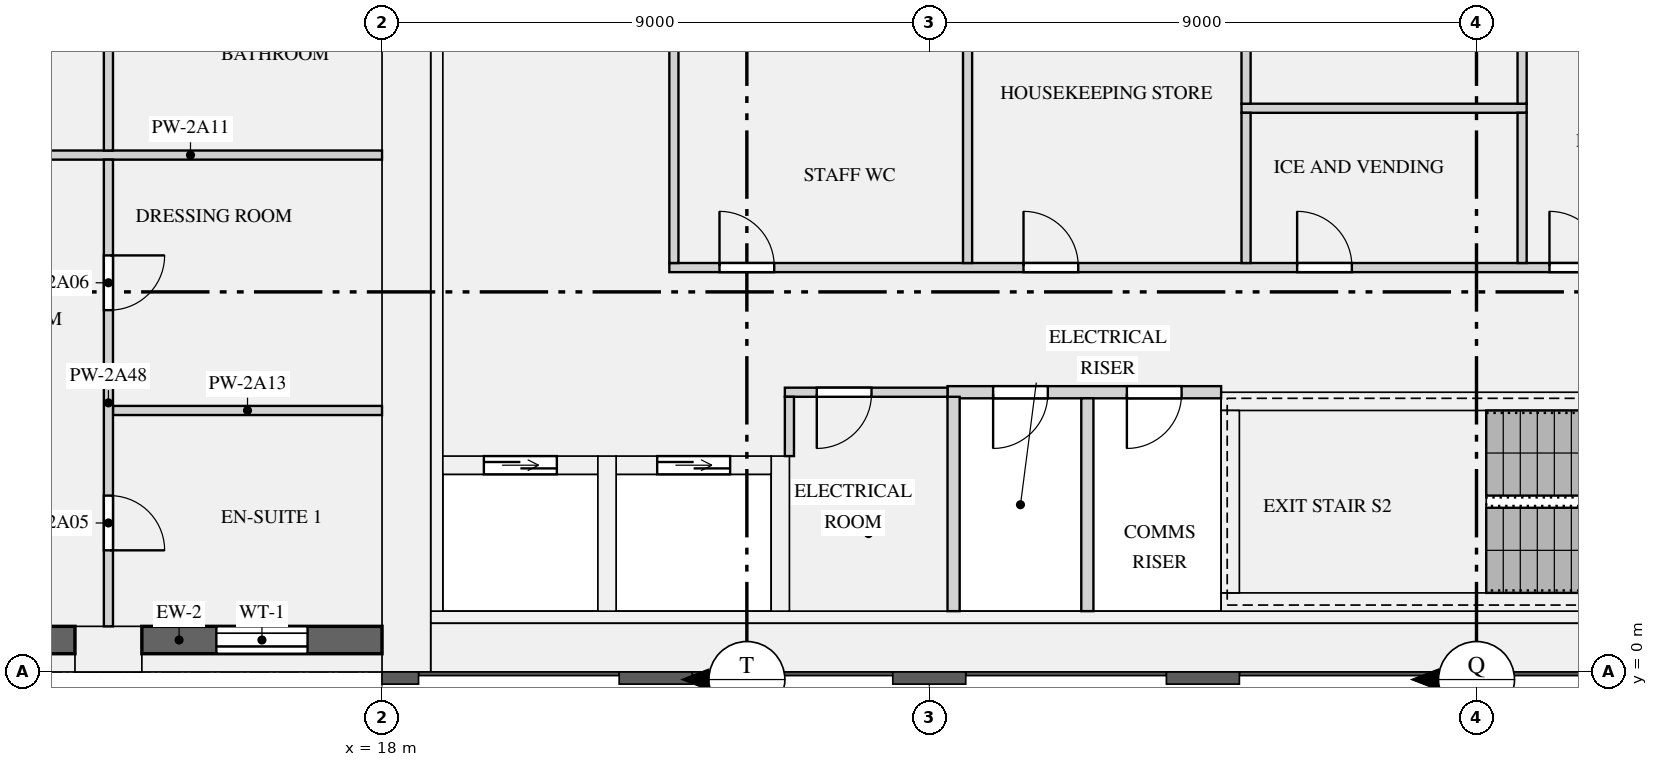
"""IFC4 building model, lengths in metres.
Left out: names, types, materials, properties, quantities, classifications, styles, units other than length and angle.
Written with IfcOpenShell. Run it as: python <this file> out.ifc"""

import sys

from ifc_helpers import new_model, si_unit, direction, frame, frame_2d, origin, origin_2d, place, context, subcontext, project, spatial, rectangle, extrude, element, fill, save


model = new_model("IFC4")
c1 = context("Model", 3, precision=1e-05, world=origin(), true_north=direction((0.0, 1.0)))
c2 = subcontext(c1, "Body", "Model", "MODEL_VIEW")
j1 = project(units=[si_unit("LENGTHUNIT", "METRE"), si_unit("PLANEANGLEUNIT", "RADIAN")], contexts=[c1])
p1 = place(None, origin())
s1 = spatial("IfcSite", under=j1, at=p1, CompositionType="ELEMENT")
p2 = place(p1, origin())
s2 = spatial("IfcBuilding", under=s1, at=p2, CompositionType="ELEMENT")
p3 = place(p2, frame((0.0, 0.0, 83.55)))
s3 = spatial("IfcBuildingStorey", under=s2, at=p3, CompositionType="ELEMENT", Elevation=83.55)
p4 = place(p3, frame((13.5, 0.375, 0.0), z_axis=(0.0, 0.0, 1.0), x_axis=(1.0, 0.0, 0.0)))
e1 = element("IfcColumn", 1, at=p4, inside=s3, PredefinedType="USERDEFINED", context=c2, shape_type="SweptSolid", body=[
    extrude(rectangle(XDim=1.1, YDim=0.75, at=origin_2d()), origin(), (0.0, 0.0, 1.0), 3.15),
])
p5 = place(p3, frame((18.4, 0.0, 0.0), z_axis=(0.0, 0.0, 1.0), x_axis=(0.0, 1.0, 0.0)))
e2 = element("IfcWall", 2, at=p5, inside=s3, PredefinedType="SHEAR", context=c2, shape_type="SweptSolid", body=[
    extrude(rectangle(XDim=12.5, YDim=0.8, at=frame_2d((6.25, 0.0))), origin(), (0.0, 0.0, 1.0), 3.15),
])
p6 = place(p3, frame((18.8, 0.4, 0.0), z_axis=(0.0, 0.0, 1.0), x_axis=(1.0, 0.0, 0.0)))
e3 = element("IfcWall", 3, at=p6, inside=s3, PredefinedType="SHEAR", context=c2, shape_type="SweptSolid", body=[
    extrude(rectangle(XDim=34.4, YDim=0.8, at=frame_2d((17.2, 0.0))), origin(), (0.0, 0.0, 1.0), 3.15),
])
p7 = place(p3, frame((18.9, 1.0, 0.0), z_axis=(0.0, 0.0, 1.0), x_axis=(0.0, 1.0, 0.0)))
e4 = element("IfcWall", 4, at=p7, inside=s3, PredefinedType="SHEAR", context=c2, shape_type="SweptSolid", body=[
    extrude(rectangle(XDim=10.9, YDim=0.2, at=frame_2d((5.45, 0.0))), origin(), (0.0, 0.0, 1.0), 3.15),
])
p8 = place(p3, frame((18.8, 0.9, 0.0), z_axis=(0.0, 0.0, 1.0), x_axis=(1.0, 0.0, 0.0)))
e5 = element("IfcWall", 5, at=p8, inside=s3, PredefinedType="SHEAR", context=c2, shape_type="SweptSolid", body=[
    extrude(rectangle(XDim=34.4, YDim=0.2, at=frame_2d((17.2, 0.0))), origin(), (0.0, 0.0, 1.0), 3.15),
])
p9 = place(p3, frame((19.0, 3.4, 0.0), z_axis=(0.0, 0.0, 1.0), x_axis=(1.0, 0.0, 0.0)))
e6 = element("IfcWall", 6, at=p9, inside=s3, PredefinedType="SHEAR", context=c2, shape_type="SweptSolid", body=[
    extrude(rectangle(XDim=2.55, YDim=0.3, at=frame_2d((1.275, 0.0))), origin(), (0.0, 0.0, 1.0), 3.15),
])
p10 = place(p9, frame((0.675, 0.0, 0.0)))
e7 = element("IfcOpeningElement", 7, at=p10, cuts=e6, PredefinedType="OPENING", context=c2, shape_type="SweptSolid", body=[
    extrude(rectangle(XDim=1.2, YDim=2.1, at=frame_2d((0.6, 1.05))), frame((0.0, 0.16, 0.0), z_axis=(0.0, -1.0, 0.0), x_axis=(1.0, 0.0, 0.0)), (0.0, 0.0, 1.0), 0.32),
])
p11 = place(p3, frame((21.85, 3.4, 0.0), z_axis=(0.0, 0.0, 1.0), x_axis=(1.0, 0.0, 0.0)))
e8 = element("IfcWall", 8, at=p11, inside=s3, PredefinedType="SHEAR", context=c2, shape_type="SweptSolid", body=[
    extrude(rectangle(XDim=2.55, YDim=0.3, at=frame_2d((1.275, 0.0))), origin(), (0.0, 0.0, 1.0), 3.15),
])
p12 = place(p11, frame((0.675, 0.0, 0.0)))
e9 = element("IfcOpeningElement", 9, at=p12, cuts=e8, PredefinedType="OPENING", context=c2, shape_type="SweptSolid", body=[
    extrude(rectangle(XDim=1.2, YDim=2.1, at=frame_2d((0.6, 1.05))), frame((0.0, 0.16, 0.0), z_axis=(0.0, -1.0, 0.0), x_axis=(1.0, 0.0, 0.0)), (0.0, 0.0, 1.0), 0.32),
])
for number, where, z_axis, x_axis in (
    (10, (21.7, 1.0, 0.0), (0.0, 0.0, 1.0), (0.0, 1.0, 0.0)),
    (11, (24.55, 1.0, 0.0), (0.0, 0.0, 1.0), (0.0, 1.0, 0.0)),
):
    element("IfcWall", number, at=place(p3, frame(where, z_axis=z_axis, x_axis=x_axis)), inside=s3, PredefinedType="SHEAR", context=c2, shape_type="SweptSolid", body=[
        extrude(rectangle(XDim=2.55, YDim=0.3, at=frame_2d((1.275, 0.0))), origin(), (0.0, 0.0, 1.0), 3.15),
    ])
p13 = place(p3, frame((31.8, 1.15, 0.0), z_axis=(0.0, 0.0, 1.0), x_axis=(1.0, 0.0, 0.0)))
e12 = element("IfcWall", 12, at=p13, inside=s3, PredefinedType="SHEAR", context=c2, shape_type="SweptSolid", body=[
    extrude(rectangle(XDim=8.4, YDim=0.3, at=frame_2d((4.2, 0.0))), origin(), (0.0, 0.0, 1.0), 3.15),
])
p14 = place(p3, frame((31.8, 4.45, 0.0), z_axis=(0.0, 0.0, 1.0), x_axis=(1.0, 0.0, 0.0)))
e13 = element("IfcWall", 13, at=p14, inside=s3, PredefinedType="SHEAR", context=c2, shape_type="SweptSolid", body=[
    extrude(rectangle(XDim=8.4, YDim=0.3, at=frame_2d((4.2, 0.0))), origin(), (0.0, 0.0, 1.0), 3.15),
])
p15 = place(p14, frame((6.8, 0.0, 0.0)))
e14 = element("IfcOpeningElement", 14, at=p15, cuts=e13, PredefinedType="OPENING", context=c2, shape_type="SweptSolid", body=[
    extrude(rectangle(XDim=1.1, YDim=2.1, at=frame_2d((0.55, 1.05))), frame((0.0, 0.16, 0.0), z_axis=(0.0, -1.0, 0.0), x_axis=(1.0, 0.0, 0.0)), (0.0, 0.0, 1.0), 0.32),
])
p16 = place(p3, frame((31.95, 1.3, 0.0), z_axis=(0.0, 0.0, 1.0), x_axis=(0.0, 1.0, 0.0)))
e15 = element("IfcWall", 15, at=p16, inside=s3, PredefinedType="SHEAR", context=c2, shape_type="SweptSolid", body=[
    extrude(rectangle(XDim=3.0, YDim=0.3, at=frame_2d((1.5, 0.0))), origin(), (0.0, 0.0, 1.0), 3.15),
])
p17 = place(p3, frame((10.1, 0.525, 0.9), z_axis=(0.0, 0.0, 1.0), x_axis=(1.0, 0.0, 0.0)))
e16 = element("IfcWall", 16, at=p17, inside=s3, PredefinedType="SOLIDWALL", context=c2, shape_type="SweptSolid", body=[
    extrude(rectangle(XDim=2.85, YDim=0.45, at=frame_2d((1.425, 0.0))), origin(), (0.0, 0.0, 1.0), 1.93),
])
p18 = place(p17, frame((0.675, 0.0, 0.15)))
e17 = element("IfcOpeningElement", 17, at=p18, cuts=e16, PredefinedType="OPENING", context=c2, shape_type="SweptSolid", body=[
    extrude(rectangle(XDim=1.5, YDim=1.5, at=frame_2d((0.75, 0.75))), frame((0.0, 0.235, 0.0), z_axis=(0.0, -1.0, 0.0), x_axis=(1.0, 0.0, 0.0)), (0.0, 0.0, 1.0), 0.47),
])
p19 = place(p3, frame((14.05, 0.525, 0.9), z_axis=(0.0, 0.0, 1.0), x_axis=(1.0, 0.0, 0.0)))
e18 = element("IfcWall", 18, at=p19, inside=s3, PredefinedType="SOLIDWALL", context=c2, shape_type="SweptSolid", body=[
    extrude(rectangle(XDim=3.95, YDim=0.45, at=frame_2d((1.975, 0.0))), origin(), (0.0, 0.0, 1.0), 1.93),
])
p20 = place(p19, frame((1.225, 0.0, 0.15)))
e19 = element("IfcOpeningElement", 19, at=p20, cuts=e18, PredefinedType="OPENING", context=c2, shape_type="SweptSolid", body=[
    extrude(rectangle(XDim=1.5, YDim=1.5, at=frame_2d((0.75, 0.75))), frame((0.0, 0.235, 0.0), z_axis=(0.0, -1.0, 0.0), x_axis=(1.0, 0.0, 0.0)), (0.0, 0.0, 1.0), 0.47),
])
p21 = place(p3, frame((27.3, 4.6, 0.0), z_axis=(0.0, 0.0, 1.0), x_axis=(1.0, 0.0, 0.0)))
e20 = element("IfcWall", 20, at=p21, inside=s3, PredefinedType="PARTITIONING", context=c2, shape_type="SweptSolid", body=[
    extrude(rectangle(XDim=4.5, YDim=0.2, at=frame_2d((2.25, 0.0))), origin(), (0.0, 0.0, 1.0), 2.83),
])
p22 = place(p21, frame((0.75, 0.0, 0.0)))
e21 = element("IfcOpeningElement", 21, at=p22, cuts=e20, PredefinedType="OPENING", context=c2, shape_type="SweptSolid", body=[
    extrude(rectangle(XDim=0.9, YDim=2.1, at=frame_2d((0.45, 1.05))), frame((0.0, 0.11, 0.0), z_axis=(0.0, -1.0, 0.0), x_axis=(1.0, 0.0, 0.0)), (0.0, 0.0, 1.0), 0.22),
])
p23 = place(p21, frame((2.95, 0.0, 0.0)))
e22 = element("IfcOpeningElement", 22, at=p23, cuts=e20, PredefinedType="OPENING", context=c2, shape_type="SweptSolid", body=[
    extrude(rectangle(XDim=0.9, YDim=2.1, at=frame_2d((0.45, 1.05))), frame((0.0, 0.11, 0.0), z_axis=(0.0, -1.0, 0.0), x_axis=(1.0, 0.0, 0.0)), (0.0, 0.0, 1.0), 0.22),
])
p24 = place(p3, frame((24.625, 4.6, 0.0), z_axis=(0.0, 0.0, 1.0), x_axis=(1.0, 0.0, 0.0)))
e23 = element("IfcWall", 23, at=p24, inside=s3, PredefinedType="PARTITIONING", context=c2, shape_type="SweptSolid", body=[
    extrude(rectangle(XDim=2.675, YDim=0.15, at=frame_2d((1.337, 0.0))), origin(), (0.0, 0.0, 1.0), 2.83),
])
p25 = place(p24, frame((0.525, 0.0, 0.0)))
e24 = element("IfcOpeningElement", 24, at=p25, cuts=e23, PredefinedType="OPENING", context=c2, shape_type="SweptSolid", body=[
    extrude(rectangle(XDim=0.9, YDim=2.1, at=frame_2d((0.45, 1.05))), frame((0.0, 0.085, 0.0), z_axis=(0.0, -1.0, 0.0), x_axis=(1.0, 0.0, 0.0)), (0.0, 0.0, 1.0), 0.17),
])
p26 = place(p3, frame((22.725, 6.65, 0.0), z_axis=(0.0, 0.0, 1.0), x_axis=(1.0, 0.0, 0.0)))
e25 = element("IfcWall", 25, at=p26, inside=s3, PredefinedType="PARTITIONING", context=c2, shape_type="SweptSolid", body=[
    extrude(rectangle(XDim=19.8, YDim=0.15, at=frame_2d((9.9, 0.0))), origin(), (0.0, 0.0, 1.0), 2.83),
])
p27 = place(p26, frame((0.825, 0.0, 0.0)))
e26 = element("IfcOpeningElement", 26, at=p27, cuts=e25, PredefinedType="OPENING", context=c2, shape_type="SweptSolid", body=[
    extrude(rectangle(XDim=0.9, YDim=2.1, at=frame_2d((0.45, 1.05))), frame((0.0, 0.085, 0.0), z_axis=(0.0, -1.0, 0.0), x_axis=(1.0, 0.0, 0.0)), (0.0, 0.0, 1.0), 0.17),
])
p28 = place(p26, frame((5.825, 0.0, 0.0)))
e27 = element("IfcOpeningElement", 27, at=p28, cuts=e25, PredefinedType="OPENING", context=c2, shape_type="SweptSolid", body=[
    extrude(rectangle(XDim=0.9, YDim=2.1, at=frame_2d((0.45, 1.05))), frame((0.0, 0.085, 0.0), z_axis=(0.0, -1.0, 0.0), x_axis=(1.0, 0.0, 0.0)), (0.0, 0.0, 1.0), 0.17),
])
p29 = place(p26, frame((10.325, 0.0, 0.0)))
e28 = element("IfcOpeningElement", 28, at=p29, cuts=e25, PredefinedType="OPENING", context=c2, shape_type="SweptSolid", body=[
    extrude(rectangle(XDim=0.9, YDim=2.1, at=frame_2d((0.45, 1.05))), frame((0.0, 0.085, 0.0), z_axis=(0.0, -1.0, 0.0), x_axis=(1.0, 0.0, 0.0)), (0.0, 0.0, 1.0), 0.17),
])
p30 = place(p26, frame((14.475, 0.0, 0.0)))
e29 = element("IfcOpeningElement", 29, at=p30, cuts=e25, PredefinedType="OPENING", context=c2, shape_type="SweptSolid", body=[
    extrude(rectangle(XDim=0.9, YDim=2.1, at=frame_2d((0.45, 1.05))), frame((0.0, 0.085, 0.0), z_axis=(0.0, -1.0, 0.0), x_axis=(1.0, 0.0, 0.0)), (0.0, 0.0, 1.0), 0.17),
])
p31 = place(p26, frame((17.825, 0.0, 0.0)))
e30 = element("IfcOpeningElement", 30, at=p31, cuts=e25, PredefinedType="OPENING", context=c2, shape_type="SweptSolid", body=[
    extrude(rectangle(XDim=0.9, YDim=2.1, at=frame_2d((0.45, 1.05))), frame((0.0, 0.085, 0.0), z_axis=(0.0, -1.0, 0.0), x_axis=(1.0, 0.0, 0.0)), (0.0, 0.0, 1.0), 0.17),
])
p32 = place(p3, frame((32.135, 9.27, 0.0), z_axis=(0.0, 0.0, 1.0), x_axis=(1.0, 0.0, 0.0)))
e31 = element("IfcWall", 31, at=p32, inside=s3, PredefinedType="PARTITIONING", context=c2, shape_type="SweptSolid", body=[
    extrude(rectangle(XDim=4.69, YDim=0.15, at=frame_2d((2.345, 0.0))), origin(), (0.0, 0.0, 1.0), 2.83),
])
p33 = place(p3, frame((27.4, 1.0, 0.0), z_axis=(0.0, 0.0, 1.0), x_axis=(0.0, 1.0, 0.0)))
e32 = element("IfcWall", 32, at=p33, inside=s3, PredefinedType="PARTITIONING", context=c2, shape_type="SweptSolid", body=[
    extrude(rectangle(XDim=3.525, YDim=0.2, at=frame_2d((1.762, 0.0))), origin(), (0.0, 0.0, 1.0), 2.83),
])
p34 = place(p3, frame((29.6, 1.0, 0.0), z_axis=(0.0, 0.0, 1.0), x_axis=(0.0, 1.0, 0.0)))
e33 = element("IfcWall", 33, at=p34, inside=s3, PredefinedType="PARTITIONING", context=c2, shape_type="SweptSolid", body=[
    extrude(rectangle(XDim=3.5, YDim=0.2, at=frame_2d((1.75, 0.0))), origin(), (0.0, 0.0, 1.0), 2.83),
])
p35 = place(p3, frame((24.7, 3.55, 0.0), z_axis=(0.0, 0.0, 1.0), x_axis=(0.0, 1.0, 0.0)))
e34 = element("IfcWall", 34, at=p35, inside=s3, PredefinedType="PARTITIONING", context=c2, shape_type="SweptSolid", body=[
    extrude(rectangle(XDim=0.975, YDim=0.15, at=frame_2d((0.487, 0.0))), origin(), (0.0, 0.0, 1.0), 2.83),
])
for number, where, z_axis, x_axis in (
    (35, (22.8, 6.725, 0.0), (0.0, 0.0, 1.0), (0.0, 1.0, 0.0)),
    (36, (27.63, 6.725, 0.0), (0.0, 0.0, 1.0), (0.0, 1.0, 0.0)),
):
    element("IfcWall", number, at=place(p3, frame(where, z_axis=z_axis, x_axis=x_axis)), inside=s3, PredefinedType="PARTITIONING", context=c2, shape_type="SweptSolid", body=[
        extrude(rectangle(XDim=5.175, YDim=0.15, at=frame_2d((2.587, 0.0))), origin(), (0.0, 0.0, 1.0), 2.83),
    ])
for number, where, z_axis, x_axis in (
    (37, (32.21, 6.725, 0.0), (0.0, 0.0, 1.0), (0.0, 1.0, 0.0)),
    (38, (36.75, 6.725, 0.0), (0.0, 0.0, 1.0), (0.0, 1.0, 0.0)),
):
    element("IfcWall", number, at=place(p3, frame(where, z_axis=z_axis, x_axis=x_axis)), inside=s3, PredefinedType="PARTITIONING", context=c2, shape_type="SweptSolid", body=[
        extrude(rectangle(XDim=2.47, YDim=0.15, at=frame_2d((1.235, 0.0))), origin(), (0.0, 0.0, 1.0), 2.83),
    ])
for number, where, z_axis, x_axis in (
    (39, (32.21, 9.345, 0.0), (0.0, 0.0, 1.0), (0.0, 1.0, 0.0)),
    (40, (36.75, 9.345, 0.0), (0.0, 0.0, 1.0), (0.0, 1.0, 0.0)),
):
    element("IfcWall", number, at=place(p3, frame(where, z_axis=z_axis, x_axis=x_axis)), inside=s3, PredefinedType="PARTITIONING", context=c2, shape_type="SweptSolid", body=[
        extrude(rectangle(XDim=2.555, YDim=0.15, at=frame_2d((1.277, 0.0))), origin(), (0.0, 0.0, 1.0), 2.83),
    ])
p36 = place(p3, frame((5.25, 8.5, 0.0), z_axis=(0.0, 0.0, 1.0), x_axis=(1.0, 0.0, 0.0)))
e41 = element("IfcWall", 41, at=p36, inside=s3, PredefinedType="PARTITIONING", context=c2, shape_type="SweptSolid", body=[
    extrude(rectangle(XDim=12.75, YDim=0.15, at=frame_2d((6.375, 0.0))), origin(), (0.0, 0.0, 1.0), 2.83),
])
p37 = place(p36, frame((5.55, 0.0, 0.0)))
e42 = element("IfcOpeningElement", 42, at=p37, cuts=e41, PredefinedType="OPENING", context=c2, shape_type="SweptSolid", body=[
    extrude(rectangle(XDim=0.9, YDim=2.1, at=frame_2d((0.45, 1.05))), frame((0.0, 0.085, 0.0), z_axis=(0.0, -1.0, 0.0), x_axis=(1.0, 0.0, 0.0)), (0.0, 0.0, 1.0), 0.17),
])
p38 = place(p3, frame((13.575, 4.3, 0.0), z_axis=(0.0, 0.0, 1.0), x_axis=(1.0, 0.0, 0.0)))
e43 = element("IfcWall", 43, at=p38, inside=s3, PredefinedType="PARTITIONING", context=c2, shape_type="SweptSolid", body=[
    extrude(rectangle(XDim=4.425, YDim=0.15, at=frame_2d((2.212, 0.0))), origin(), (0.0, 0.0, 1.0), 2.83),
])
p39 = place(p3, frame((13.5, 0.75, 0.0), z_axis=(0.0, 0.0, 1.0), x_axis=(0.0, 1.0, 0.0)))
e44 = element("IfcWall", 44, at=p39, inside=s3, PredefinedType="PARTITIONING", context=c2, shape_type="SweptSolid", body=[
    extrude(rectangle(XDim=7.675, YDim=0.15, at=frame_2d((3.837, 0.0))), origin(), (0.0, 0.0, 1.0), 2.83),
])
p40 = place(p39, frame((1.25, 0.0, 0.0)))
e45 = element("IfcOpeningElement", 45, at=p40, cuts=e44, PredefinedType="OPENING", context=c2, shape_type="SweptSolid", body=[
    extrude(rectangle(XDim=0.9, YDim=2.1, at=frame_2d((0.45, 1.05))), frame((0.0, 0.085, 0.0), z_axis=(0.0, -1.0, 0.0), x_axis=(1.0, 0.0, 0.0)), (0.0, 0.0, 1.0), 0.17),
])
p41 = place(p39, frame((5.2, 0.0, 0.0)))
e46 = element("IfcOpeningElement", 46, at=p41, cuts=e44, PredefinedType="OPENING", context=c2, shape_type="SweptSolid", body=[
    extrude(rectangle(XDim=0.9, YDim=2.1, at=frame_2d((0.45, 1.05))), frame((0.0, 0.085, 0.0), z_axis=(0.0, -1.0, 0.0), x_axis=(1.0, 0.0, 0.0)), (0.0, 0.0, 1.0), 0.17),
])
p42 = place(p3, frame((13.5, 8.575, 0.0), z_axis=(0.0, 0.0, 1.0), x_axis=(0.0, 1.0, 0.0)))
e47 = element("IfcWall", 47, at=p42, inside=s3, PredefinedType="PARTITIONING", context=c2, shape_type="SweptSolid", body=[
    extrude(rectangle(XDim=3.85, YDim=0.15, at=frame_2d((1.925, 0.0))), origin(), (0.0, 0.0, 1.0), 2.83),
])
p43 = place(p20, origin())
e48 = element("IfcWindow", 48, at=p43, inside=s3, PartitioningType="SINGLE_PANEL", PredefinedType="WINDOW", context=c2, shape_type="SweptSolid", body=[
    extrude(rectangle(XDim=1.5, YDim=1.5, at=frame_2d((0.75, 0.75))), frame((0.0, -0.065, 0.0), z_axis=(0.0, -1.0, 0.0), x_axis=(1.0, 0.0, 0.0)), (0.0, 0.0, 1.0), 0.06),
])
fill(e19, e48)
p44 = place(p10, origin())
e49 = element("IfcDoor", 49, at=p44, inside=s3, OperationType="DOUBLE_DOOR_SLIDING", PredefinedType="DOOR", context=c2, shape_type="SweptSolid", body=[
    extrude(rectangle(XDim=1.2, YDim=2.1, at=frame_2d((0.6, 1.05))), frame((0.0, 0.025, 0.0), z_axis=(0.0, -1.0, 0.0), x_axis=(1.0, 0.0, 0.0)), (0.0, 0.0, 1.0), 0.05),
])
fill(e7, e49)
p45 = place(p12, origin())
e50 = element("IfcDoor", 50, at=p45, inside=s3, OperationType="DOUBLE_DOOR_SLIDING", PredefinedType="DOOR", context=c2, shape_type="SweptSolid", body=[
    extrude(rectangle(XDim=1.2, YDim=2.1, at=frame_2d((0.6, 1.05))), frame((0.0, 0.025, 0.0), z_axis=(0.0, -1.0, 0.0), x_axis=(1.0, 0.0, 0.0)), (0.0, 0.0, 1.0), 0.05),
])
fill(e9, e50)
p46 = place(p25, frame((0.9, 0.0, 0.0), z_axis=(0.0, 0.0, 1.0), x_axis=(-1.0, 0.0, 0.0)))
e51 = element("IfcDoor", 51, at=p46, inside=s3, OperationType="SINGLE_SWING_RIGHT", PredefinedType="DOOR", context=c2, shape_type="SweptSolid", body=[
    extrude(rectangle(XDim=0.9, YDim=2.1, at=frame_2d((0.45, 1.05))), frame((0.0, 0.025, 0.0), z_axis=(0.0, -1.0, 0.0), x_axis=(1.0, 0.0, 0.0)), (0.0, 0.0, 1.0), 0.05),
])
fill(e24, e51)
p47 = place(p27, origin())
e52 = element("IfcDoor", 52, at=p47, inside=s3, OperationType="SINGLE_SWING_LEFT", PredefinedType="DOOR", context=c2, shape_type="SweptSolid", body=[
    extrude(rectangle(XDim=0.9, YDim=2.1, at=frame_2d((0.45, 1.05))), frame((0.0, 0.025, 0.0), z_axis=(0.0, -1.0, 0.0), x_axis=(1.0, 0.0, 0.0)), (0.0, 0.0, 1.0), 0.05),
])
fill(e26, e52)
p48 = place(p28, origin())
e53 = element("IfcDoor", 53, at=p48, inside=s3, OperationType="SINGLE_SWING_LEFT", PredefinedType="DOOR", context=c2, shape_type="SweptSolid", body=[
    extrude(rectangle(XDim=0.9, YDim=2.1, at=frame_2d((0.45, 1.05))), frame((0.0, 0.025, 0.0), z_axis=(0.0, -1.0, 0.0), x_axis=(1.0, 0.0, 0.0)), (0.0, 0.0, 1.0), 0.05),
])
fill(e27, e53)
p49 = place(p29, origin())
e54 = element("IfcDoor", 54, at=p49, inside=s3, OperationType="SINGLE_SWING_LEFT", PredefinedType="DOOR", context=c2, shape_type="SweptSolid", body=[
    extrude(rectangle(XDim=0.9, YDim=2.1, at=frame_2d((0.45, 1.05))), frame((0.0, 0.025, 0.0), z_axis=(0.0, -1.0, 0.0), x_axis=(1.0, 0.0, 0.0)), (0.0, 0.0, 1.0), 0.05),
])
fill(e28, e54)
p50 = place(p30, origin())
e55 = element("IfcDoor", 55, at=p50, inside=s3, OperationType="SINGLE_SWING_LEFT", PredefinedType="DOOR", context=c2, shape_type="SweptSolid", body=[
    extrude(rectangle(XDim=0.9, YDim=2.1, at=frame_2d((0.45, 1.05))), frame((0.0, 0.025, 0.0), z_axis=(0.0, -1.0, 0.0), x_axis=(1.0, 0.0, 0.0)), (0.0, 0.0, 1.0), 0.05),
])
fill(e29, e55)
p51 = place(p22, frame((0.9, 0.0, 0.0), z_axis=(0.0, 0.0, 1.0), x_axis=(-1.0, 0.0, 0.0)))
e56 = element("IfcDoor", 56, at=p51, inside=s3, OperationType="SINGLE_SWING_RIGHT", PredefinedType="DOOR", context=c2, shape_type="SweptSolid", body=[
    extrude(rectangle(XDim=0.9, YDim=2.1, at=frame_2d((0.45, 1.05))), frame((0.0, 0.025, 0.0), z_axis=(0.0, -1.0, 0.0), x_axis=(1.0, 0.0, 0.0)), (0.0, 0.0, 1.0), 0.05),
])
fill(e21, e56)
p52 = place(p23, frame((0.9, 0.0, 0.0), z_axis=(0.0, 0.0, 1.0), x_axis=(-1.0, 0.0, 0.0)))
e57 = element("IfcDoor", 57, at=p52, inside=s3, OperationType="SINGLE_SWING_RIGHT", PredefinedType="DOOR", context=c2, shape_type="SweptSolid", body=[
    extrude(rectangle(XDim=0.9, YDim=2.1, at=frame_2d((0.45, 1.05))), frame((0.0, 0.025, 0.0), z_axis=(0.0, -1.0, 0.0), x_axis=(1.0, 0.0, 0.0)), (0.0, 0.0, 1.0), 0.05),
])
fill(e22, e57)
p53 = place(p40, frame((0.9, 0.0, 0.0), z_axis=(0.0, 0.0, 1.0), x_axis=(-1.0, 0.0, 0.0)))
e58 = element("IfcDoor", 58, at=p53, inside=s3, OperationType="SINGLE_SWING_RIGHT", PredefinedType="DOOR", context=c2, shape_type="SweptSolid", body=[
    extrude(rectangle(XDim=0.9, YDim=2.1, at=frame_2d((0.45, 1.05))), frame((0.0, 0.025, 0.0), z_axis=(0.0, -1.0, 0.0), x_axis=(1.0, 0.0, 0.0)), (0.0, 0.0, 1.0), 0.05),
])
fill(e45, e58)
p54 = place(p41, frame((0.9, 0.0, 0.0), z_axis=(0.0, 0.0, 1.0), x_axis=(-1.0, 0.0, 0.0)))
e59 = element("IfcDoor", 59, at=p54, inside=s3, OperationType="SINGLE_SWING_LEFT", PredefinedType="DOOR", context=c2, shape_type="SweptSolid", body=[
    extrude(rectangle(XDim=0.9, YDim=2.1, at=frame_2d((0.45, 1.05))), frame((0.0, 0.025, 0.0), z_axis=(0.0, -1.0, 0.0), x_axis=(1.0, 0.0, 0.0)), (0.0, 0.0, 1.0), 0.05),
])
fill(e46, e59)
save(model, sys.argv[1])
